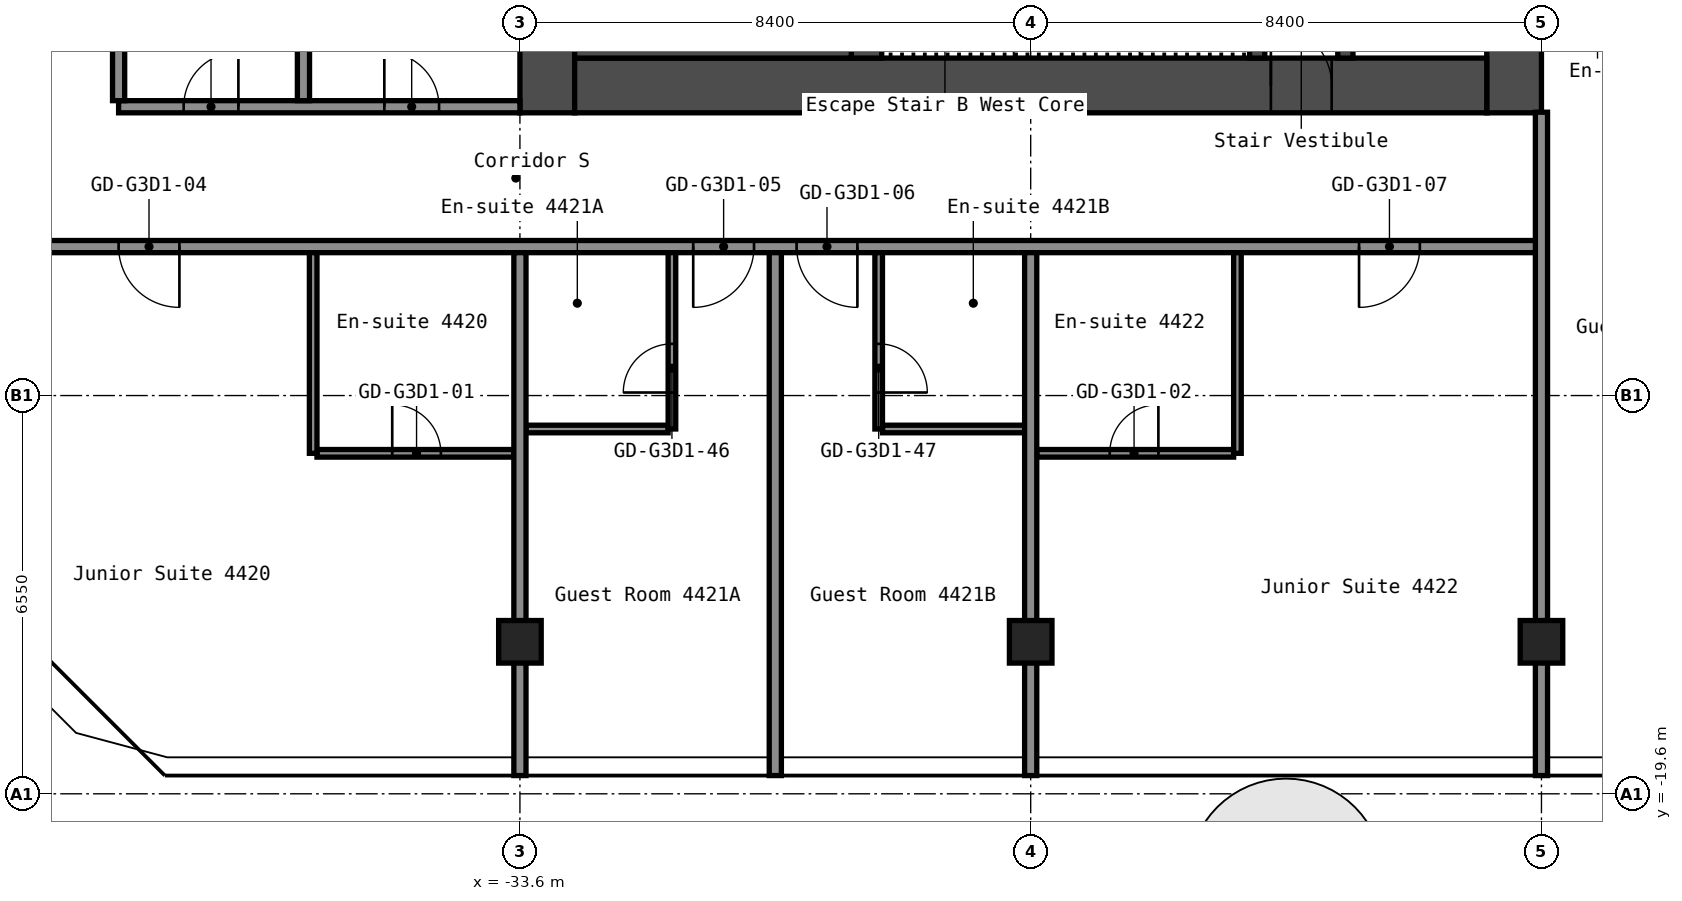
"""IFC4 building model, lengths in metres.
Left out: names, types, materials, properties, quantities, classifications, styles, units other than length and angle.
Written with IfcOpenShell. Run it as: python <this file> out.ifc"""

import sys

from ifc_helpers import new_model, si_unit, direction, frame, frame_2d, origin, origin_2d, place, context, subcontext, project, spatial, rectangle, hollow_rectangle, extrude, element, fill, save


model = new_model("IFC4")
c1 = context("Model", 3, precision=1e-05, world=origin(), true_north=direction((0.0, 1.0)))
c2 = subcontext(c1, "Body", "Model", "MODEL_VIEW")
j1 = project(units=[si_unit("LENGTHUNIT", "METRE"), si_unit("PLANEANGLEUNIT", "RADIAN")], contexts=[c1])
p1 = place(None, origin())
s1 = spatial("IfcSite", under=j1, at=p1, CompositionType="ELEMENT")
p2 = place(p1, origin())
s2 = spatial("IfcBuilding", under=s1, at=p2, CompositionType="ELEMENT")
p3 = place(p2, frame((0.0, 0.0, 156.6)))
s3 = spatial("IfcBuildingStorey", under=s2, at=p3, CompositionType="ELEMENT", Elevation=156.6)
for number, where, z_axis, x_axis in (
    (1, (-33.6, -17.1, 0.0), (0.0, 0.0, 1.0), (1.0, 0.0, 0.0)),
    (2, (-25.2, -17.1, 0.0), (0.0, 0.0, 1.0), (1.0, 0.0, 0.0)),
    (3, (-16.8, -17.1, 0.0), (0.0, 0.0, 1.0), (1.0, 0.0, 0.0)),
):
    element("IfcColumn", number, at=place(p3, frame(where, z_axis=z_axis, x_axis=x_axis)), inside=s3, PredefinedType="COLUMN", context=c2, shape_type="SweptSolid", body=[
        extrude(hollow_rectangle(XDim=0.7, YDim=0.7, WallThickness=0.028, at=origin_2d()), origin(), (0.0, 0.0, 1.0), 2.75),
    ])
p4 = place(p3, frame((-17.25, -8.4, 0.0), z_axis=(0.0, 0.0, 1.0), x_axis=(0.0, 1.0, 0.0)))
e4 = element("IfcWall", 4, at=p4, inside=s3, PredefinedType="SHEAR", context=c2, shape_type="SweptSolid", body=[
    extrude(rectangle(XDim=16.8, YDim=0.9, at=frame_2d((8.4, 0.0))), origin(), (0.0, 0.0, 1.0), 2.75),
])
p5 = place(p4, frame((7.1, 0.0, 0.0)))
e5 = element("IfcOpeningElement", 5, at=p5, cuts=e4, PredefinedType="OPENING", context=c2, shape_type="SweptSolid", body=[
    extrude(rectangle(XDim=1.6, YDim=2.1, at=frame_2d((0.8, 1.05))), frame((0.0, 0.46, 0.0), z_axis=(0.0, -1.0, 0.0), x_axis=(1.0, 0.0, 0.0)), (0.0, 0.0, 1.0), 0.92),
])
p6 = place(p3, frame((-33.15, -8.4, 0.0), z_axis=(0.0, 0.0, 1.0), x_axis=(0.0, 1.0, 0.0)))
e6 = element("IfcWall", 6, at=p6, inside=s3, PredefinedType="SHEAR", context=c2, shape_type="SweptSolid", body=[
    extrude(rectangle(XDim=16.8, YDim=0.9, at=frame_2d((8.4, 0.0))), origin(), (0.0, 0.0, 1.0), 2.75),
])
p7 = place(p3, frame((-32.7, -7.95, 0.0), z_axis=(0.0, 0.0, 1.0), x_axis=(1.0, 0.0, 0.0)))
e7 = element("IfcWall", 7, at=p7, inside=s3, PredefinedType="SHEAR", context=c2, shape_type="SweptSolid", body=[
    extrude(rectangle(XDim=15.0, YDim=0.9, at=frame_2d((7.5, 0.0))), origin(), (0.0, 0.0, 1.0), 2.75),
])
p8 = place(p7, frame((11.45, 0.0, 0.0)))
e8 = element("IfcOpeningElement", 8, at=p8, cuts=e7, PredefinedType="OPENING", context=c2, shape_type="SweptSolid", body=[
    extrude(rectangle(XDim=1.0, YDim=2.1, at=frame_2d((0.5, 1.05))), frame((0.0, 0.46, 0.0), z_axis=(0.0, -1.0, 0.0), x_axis=(1.0, 0.0, 0.0)), (0.0, 0.0, 1.0), 0.92),
])
p9 = place(p3, frame((-20.025, -7.5, 0.0), z_axis=(0.0, 0.0, 1.0), x_axis=(0.0, 1.0, 0.0)))
e9 = element("IfcWall", 9, at=p9, inside=s3, PredefinedType="SHEAR", context=c2, shape_type="SweptSolid", body=[
    extrude(rectangle(XDim=6.3, YDim=0.25, at=frame_2d((3.15, 0.0))), origin(), (0.0, 0.0, 1.0), 2.75),
])
p10 = place(p9, frame((2.4, 0.0, 0.0)))
e10 = element("IfcOpeningElement", 10, at=p10, cuts=e9, PredefinedType="OPENING", context=c2, shape_type="SweptSolid", body=[
    extrude(rectangle(XDim=1.0, YDim=2.1, at=frame_2d((0.5, 1.05))), frame((0.0, 0.135, 0.0), z_axis=(0.0, -1.0, 0.0), x_axis=(1.0, 0.0, 0.0)), (0.0, 0.0, 1.0), 0.27),
])
p11 = place(p3, frame((-21.475, -7.5, 0.0), z_axis=(0.0, 0.0, 1.0), x_axis=(0.0, 1.0, 0.0)))
e11 = element("IfcWall", 11, at=p11, inside=s3, PredefinedType="SHEAR", context=c2, shape_type="SweptSolid", body=[
    extrude(rectangle(XDim=3.75, YDim=0.25, at=frame_2d((1.875, 0.0))), origin(), (0.0, 0.0, 1.0), 2.75),
])
p12 = place(p11, frame((1.3, 0.0, 0.0)))
e12 = element("IfcOpeningElement", 12, at=p12, cuts=e11, PredefinedType="OPENING", context=c2, shape_type="SweptSolid", body=[
    extrude(rectangle(XDim=1.2, YDim=2.1, at=frame_2d((0.6, 1.05))), frame((0.0, 0.135, 0.0), z_axis=(0.0, -1.0, 0.0), x_axis=(1.0, 0.0, 0.0)), (0.0, 0.0, 1.0), 0.27),
])
p13 = place(p3, frame((-27.9, -7.5, 0.0), z_axis=(0.0, 0.0, 1.0), x_axis=(0.0, 1.0, 0.0)))
e13 = element("IfcWall", 13, at=p13, inside=s3, PredefinedType="SHEAR", context=c2, shape_type="SweptSolid", body=[
    extrude(rectangle(XDim=3.75, YDim=0.5, at=frame_2d((1.875, 0.0))), origin(), (0.0, 0.0, 1.0), 2.75),
])
p14 = place(p3, frame((-32.7, -6.75, 0.0), z_axis=(0.0, 0.0, 1.0), x_axis=(1.0, 0.0, 0.0)))
e14 = element("IfcWall", 14, at=p14, inside=s3, PredefinedType="SHEAR", context=c2, shape_type="SweptSolid", body=[
    extrude(rectangle(XDim=4.55, YDim=1.5, at=frame_2d((2.275, 0.0))), origin(), (0.0, 0.0, 1.0), 2.75),
])
p15 = place(p3, frame((-36.938, -14.0, 0.0), z_axis=(0.0, 0.0, 1.0), x_axis=(1.0, 0.0, 0.0)))
e15 = element("IfcWall", 15, at=p15, inside=s3, PredefinedType="PARTITIONING", context=c2, shape_type="SweptSolid", body=[
    extrude(rectangle(XDim=3.238, YDim=0.125, at=frame_2d((1.619, 0.0))), origin(), (0.0, 0.0, 1.0), 2.75),
])
p16 = place(p15, frame((1.238, 0.0, 0.0)))
e16 = element("IfcOpeningElement", 16, at=p16, cuts=e15, PredefinedType="OPENING", context=c2, shape_type="SweptSolid", body=[
    extrude(rectangle(XDim=0.8, YDim=2.1, at=frame_2d((0.4, 1.05))), frame((0.0, 0.073, 0.0), z_axis=(0.0, -1.0, 0.0), x_axis=(1.0, 0.0, 0.0)), (0.0, 0.0, 1.0), 0.145),
])
p17 = place(p3, frame((-25.1, -14.0, 0.0), z_axis=(0.0, 0.0, 1.0), x_axis=(1.0, 0.0, 0.0)))
e17 = element("IfcWall", 17, at=p17, inside=s3, PredefinedType="PARTITIONING", context=c2, shape_type="SweptSolid", body=[
    extrude(rectangle(XDim=3.238, YDim=0.125, at=frame_2d((1.619, 0.0))), origin(), (0.0, 0.0, 1.0), 2.75),
])
p18 = place(p17, frame((1.2, 0.0, 0.0)))
e18 = element("IfcOpeningElement", 18, at=p18, cuts=e17, PredefinedType="OPENING", context=c2, shape_type="SweptSolid", body=[
    extrude(rectangle(XDim=0.8, YDim=2.1, at=frame_2d((0.4, 1.05))), frame((0.0, 0.073, 0.0), z_axis=(0.0, -1.0, 0.0), x_axis=(1.0, 0.0, 0.0)), (0.0, 0.0, 1.0), 0.145),
])
for number, where, z_axis, x_axis in (
    (19, (-33.5, -13.6, 0.0), (0.0, 0.0, 1.0), (1.0, 0.0, 0.0)),
    (20, (-27.637, -13.6, 0.0), (0.0, 0.0, 1.0), (1.0, 0.0, 0.0)),
):
    element("IfcWall", number, at=place(p3, frame(where, z_axis=z_axis, x_axis=x_axis)), inside=s3, PredefinedType="PARTITIONING", context=c2, shape_type="SweptSolid", body=[
        extrude(rectangle(XDim=2.337, YDim=0.125, at=frame_2d((1.169, 0.0))), origin(), (0.0, 0.0, 1.0), 2.75),
    ])
p19 = place(p3, frame((-42.7, -10.6, 0.0), z_axis=(0.0, 0.0, 1.0), x_axis=(1.0, 0.0, 0.0)))
e21 = element("IfcWall", 21, at=p19, inside=s3, PredefinedType="PARTITIONING", context=c2, shape_type="SweptSolid", body=[
    extrude(rectangle(XDim=25.9, YDim=0.2, at=frame_2d((12.95, 0.0))), origin(), (0.0, 0.0, 1.0), 2.75),
])
p20 = place(p19, frame((2.5, 0.0, 0.0)))
e22 = element("IfcOpeningElement", 22, at=p20, cuts=e21, PredefinedType="OPENING", context=c2, shape_type="SweptSolid", body=[
    extrude(rectangle(XDim=1.0, YDim=2.1, at=frame_2d((0.5, 1.05))), frame((0.0, 0.11, 0.0), z_axis=(0.0, -1.0, 0.0), x_axis=(1.0, 0.0, 0.0)), (0.0, 0.0, 1.0), 0.22),
])
p21 = place(p19, frame((11.95, 0.0, 0.0)))
e23 = element("IfcOpeningElement", 23, at=p21, cuts=e21, PredefinedType="OPENING", context=c2, shape_type="SweptSolid", body=[
    extrude(rectangle(XDim=1.0, YDim=2.1, at=frame_2d((0.5, 1.05))), frame((0.0, 0.11, 0.0), z_axis=(0.0, -1.0, 0.0), x_axis=(1.0, 0.0, 0.0)), (0.0, 0.0, 1.0), 0.22),
])
p22 = place(p19, frame((13.65, 0.0, 0.0)))
e24 = element("IfcOpeningElement", 24, at=p22, cuts=e21, PredefinedType="OPENING", context=c2, shape_type="SweptSolid", body=[
    extrude(rectangle(XDim=1.0, YDim=2.1, at=frame_2d((0.5, 1.05))), frame((0.0, 0.11, 0.0), z_axis=(0.0, -1.0, 0.0), x_axis=(1.0, 0.0, 0.0)), (0.0, 0.0, 1.0), 0.22),
])
p23 = place(p19, frame((22.9, 0.0, 0.0)))
e25 = element("IfcOpeningElement", 25, at=p23, cuts=e21, PredefinedType="OPENING", context=c2, shape_type="SweptSolid", body=[
    extrude(rectangle(XDim=1.0, YDim=2.1, at=frame_2d((0.5, 1.05))), frame((0.0, 0.11, 0.0), z_axis=(0.0, -1.0, 0.0), x_axis=(1.0, 0.0, 0.0)), (0.0, 0.0, 1.0), 0.22),
])
p24 = place(p3, frame((-40.2, -8.3, 0.0), z_axis=(0.0, 0.0, 1.0), x_axis=(1.0, 0.0, 0.0)))
e26 = element("IfcWall", 26, at=p24, inside=s3, PredefinedType="PARTITIONING", context=c2, shape_type="SweptSolid", body=[
    extrude(rectangle(XDim=6.6, YDim=0.2, at=frame_2d((3.3, 0.0))), origin(), (0.0, 0.0, 1.0), 2.75),
])
p25 = place(p24, frame((1.07, 0.0, 0.0)))
e27 = element("IfcOpeningElement", 27, at=p25, cuts=e26, PredefinedType="OPENING", context=c2, shape_type="SweptSolid", body=[
    extrude(rectangle(XDim=0.9, YDim=2.1, at=frame_2d((0.45, 1.05))), frame((0.0, 0.11, 0.0), z_axis=(0.0, -1.0, 0.0), x_axis=(1.0, 0.0, 0.0)), (0.0, 0.0, 1.0), 0.22),
])
p26 = place(p24, frame((4.37, 0.0, 0.0)))
e28 = element("IfcOpeningElement", 28, at=p26, cuts=e26, PredefinedType="OPENING", context=c2, shape_type="SweptSolid", body=[
    extrude(rectangle(XDim=0.9, YDim=2.1, at=frame_2d((0.45, 1.05))), frame((0.0, 0.11, 0.0), z_axis=(0.0, -1.0, 0.0), x_axis=(1.0, 0.0, 0.0)), (0.0, 0.0, 1.0), 0.22),
])
p27 = place(p3, frame((-40.2, -8.2, 0.0), z_axis=(0.0, 0.0, 1.0), x_axis=(0.0, 1.0, 0.0)))
e29 = element("IfcWall", 29, at=p27, inside=s3, PredefinedType="PARTITIONING", context=c2, shape_type="SweptSolid", body=[
    extrude(rectangle(XDim=16.4, YDim=0.2, at=frame_2d((8.2, 0.0))), origin(), (0.0, 0.0, 1.0), 2.75),
])
p28 = place(p3, frame((-37.16, -8.2, 0.0), z_axis=(0.0, 0.0, 1.0), x_axis=(0.0, 1.0, 0.0)))
e30 = element("IfcWall", 30, at=p28, inside=s3, PredefinedType="PARTITIONING", context=c2, shape_type="SweptSolid", body=[
    extrude(rectangle(XDim=8.2, YDim=0.2, at=frame_2d((4.1, 0.0))), origin(), (0.0, 0.0, 1.0), 2.75),
])
p29 = place(p3, frame((-37.0, -14.0, 0.0), z_axis=(0.0, 0.0, 1.0), x_axis=(0.0, 1.0, 0.0)))
e31 = element("IfcWall", 31, at=p29, inside=s3, PredefinedType="PARTITIONING", context=c2, shape_type="SweptSolid", body=[
    extrude(rectangle(XDim=3.3, YDim=0.125, at=frame_2d((1.65, 0.0))), origin(), (0.0, 0.0, 1.0), 2.75),
])
p30 = place(p3, frame((-33.6, -19.3, 0.0), z_axis=(0.0, 0.0, 1.0), x_axis=(0.0, 1.0, 0.0)))
e32 = element("IfcWall", 32, at=p30, inside=s3, PredefinedType="PARTITIONING", context=c2, shape_type="SweptSolid", body=[
    extrude(rectangle(XDim=8.6, YDim=0.2, at=frame_2d((4.3, 0.0))), origin(), (0.0, 0.0, 1.0), 2.75),
])
p31 = place(p3, frame((-31.1, -13.6, 0.0), z_axis=(0.0, 0.0, 1.0), x_axis=(0.0, 1.0, 0.0)))
e33 = element("IfcWall", 33, at=p31, inside=s3, PredefinedType="PARTITIONING", context=c2, shape_type="SweptSolid", body=[
    extrude(rectangle(XDim=2.9, YDim=0.125, at=frame_2d((1.45, 0.0))), origin(), (0.0, 0.0, 1.0), 2.75),
])
p32 = place(p31, frame((0.6, 0.0, 0.0)))
e34 = element("IfcOpeningElement", 34, at=p32, cuts=e33, PredefinedType="OPENING", context=c2, shape_type="SweptSolid", body=[
    extrude(rectangle(XDim=0.8, YDim=2.1, at=frame_2d((0.4, 1.05))), frame((0.0, 0.073, 0.0), z_axis=(0.0, -1.0, 0.0), x_axis=(1.0, 0.0, 0.0)), (0.0, 0.0, 1.0), 0.145),
])
p33 = place(p3, frame((-29.4, -19.3, 0.0), z_axis=(0.0, 0.0, 1.0), x_axis=(0.0, 1.0, 0.0)))
e35 = element("IfcWall", 35, at=p33, inside=s3, PredefinedType="PARTITIONING", context=c2, shape_type="SweptSolid", body=[
    extrude(rectangle(XDim=8.6, YDim=0.2, at=frame_2d((4.3, 0.0))), origin(), (0.0, 0.0, 1.0), 2.75),
])
p34 = place(p3, frame((-27.7, -13.6, 0.0), z_axis=(0.0, 0.0, 1.0), x_axis=(0.0, 1.0, 0.0)))
e36 = element("IfcWall", 36, at=p34, inside=s3, PredefinedType="PARTITIONING", context=c2, shape_type="SweptSolid", body=[
    extrude(rectangle(XDim=2.9, YDim=0.125, at=frame_2d((1.45, 0.0))), origin(), (0.0, 0.0, 1.0), 2.75),
])
p35 = place(p34, frame((0.6, 0.0, 0.0)))
e37 = element("IfcOpeningElement", 37, at=p35, cuts=e36, PredefinedType="OPENING", context=c2, shape_type="SweptSolid", body=[
    extrude(rectangle(XDim=0.8, YDim=2.1, at=frame_2d((0.4, 1.05))), frame((0.0, 0.073, 0.0), z_axis=(0.0, -1.0, 0.0), x_axis=(1.0, 0.0, 0.0)), (0.0, 0.0, 1.0), 0.145),
])
p36 = place(p3, frame((-25.2, -19.3, 0.0), z_axis=(0.0, 0.0, 1.0), x_axis=(0.0, 1.0, 0.0)))
e38 = element("IfcWall", 38, at=p36, inside=s3, PredefinedType="PARTITIONING", context=c2, shape_type="SweptSolid", body=[
    extrude(rectangle(XDim=8.6, YDim=0.2, at=frame_2d((4.3, 0.0))), origin(), (0.0, 0.0, 1.0), 2.75),
])
p37 = place(p3, frame((-21.8, -14.0, 0.0), z_axis=(0.0, 0.0, 1.0), x_axis=(0.0, 1.0, 0.0)))
e39 = element("IfcWall", 39, at=p37, inside=s3, PredefinedType="PARTITIONING", context=c2, shape_type="SweptSolid", body=[
    extrude(rectangle(XDim=3.3, YDim=0.125, at=frame_2d((1.65, 0.0))), origin(), (0.0, 0.0, 1.0), 2.75),
])
p38 = place(p3, frame((-16.8, -19.3, 0.0), z_axis=(0.0, 0.0, 1.0), x_axis=(0.0, 1.0, 0.0)))
e40 = element("IfcWall", 40, at=p38, inside=s3, PredefinedType="PARTITIONING", context=c2, shape_type="SweptSolid", body=[
    extrude(rectangle(XDim=10.91, YDim=0.2, at=frame_2d((5.455, 0.0))), origin(), (0.0, 0.0, 1.0), 2.75),
])
p39 = place(p8, origin())
e41 = element("IfcDoor", 41, at=p39, inside=s3, OperationType="SINGLE_SWING_RIGHT", PredefinedType="DOOR", context=c2, shape_type="SweptSolid", body=[
    extrude(rectangle(XDim=1.0, YDim=2.1, at=frame_2d((0.5, 1.05))), frame((0.0, 0.025, 0.0), z_axis=(0.0, -1.0, 0.0), x_axis=(1.0, 0.0, 0.0)), (0.0, 0.0, 1.0), 0.05),
])
fill(e8, e41)
p40 = place(p16, origin())
e42 = element("IfcDoor", 42, at=p40, inside=s3, OperationType="SINGLE_SWING_RIGHT", PredefinedType="DOOR", context=c2, shape_type="SweptSolid", body=[
    extrude(rectangle(XDim=0.8, YDim=2.1, at=frame_2d((0.4, 1.05))), frame((0.0, 0.025, 0.0), z_axis=(0.0, -1.0, 0.0), x_axis=(1.0, 0.0, 0.0)), (0.0, 0.0, 1.0), 0.05),
])
fill(e16, e42)
p41 = place(p18, origin())
e43 = element("IfcDoor", 43, at=p41, inside=s3, OperationType="SINGLE_SWING_LEFT", PredefinedType="DOOR", context=c2, shape_type="SweptSolid", body=[
    extrude(rectangle(XDim=0.8, YDim=2.1, at=frame_2d((0.4, 1.05))), frame((0.0, 0.025, 0.0), z_axis=(0.0, -1.0, 0.0), x_axis=(1.0, 0.0, 0.0)), (0.0, 0.0, 1.0), 0.05),
])
fill(e18, e43)
p42 = place(p20, origin())
e44 = element("IfcDoor", 44, at=p42, inside=s3, OperationType="SINGLE_SWING_RIGHT", PredefinedType="DOOR", context=c2, shape_type="SweptSolid", body=[
    extrude(rectangle(XDim=1.0, YDim=2.1, at=frame_2d((0.5, 1.05))), frame((0.0, 0.025, 0.0), z_axis=(0.0, -1.0, 0.0), x_axis=(1.0, 0.0, 0.0)), (0.0, 0.0, 1.0), 0.05),
])
fill(e22, e44)
p43 = place(p21, origin())
e45 = element("IfcDoor", 45, at=p43, inside=s3, OperationType="SINGLE_SWING_LEFT", PredefinedType="DOOR", context=c2, shape_type="SweptSolid", body=[
    extrude(rectangle(XDim=1.0, YDim=2.1, at=frame_2d((0.5, 1.05))), frame((0.0, 0.025, 0.0), z_axis=(0.0, -1.0, 0.0), x_axis=(1.0, 0.0, 0.0)), (0.0, 0.0, 1.0), 0.05),
])
fill(e23, e45)
p44 = place(p22, origin())
e46 = element("IfcDoor", 46, at=p44, inside=s3, OperationType="SINGLE_SWING_RIGHT", PredefinedType="DOOR", context=c2, shape_type="SweptSolid", body=[
    extrude(rectangle(XDim=1.0, YDim=2.1, at=frame_2d((0.5, 1.05))), frame((0.0, 0.025, 0.0), z_axis=(0.0, -1.0, 0.0), x_axis=(1.0, 0.0, 0.0)), (0.0, 0.0, 1.0), 0.05),
])
fill(e24, e46)
p45 = place(p23, origin())
e47 = element("IfcDoor", 47, at=p45, inside=s3, OperationType="SINGLE_SWING_LEFT", PredefinedType="DOOR", context=c2, shape_type="SweptSolid", body=[
    extrude(rectangle(XDim=1.0, YDim=2.1, at=frame_2d((0.5, 1.05))), frame((0.0, 0.025, 0.0), z_axis=(0.0, -1.0, 0.0), x_axis=(1.0, 0.0, 0.0)), (0.0, 0.0, 1.0), 0.05),
])
fill(e25, e47)
p46 = place(p25, origin())
e48 = element("IfcDoor", 48, at=p46, inside=s3, OperationType="SINGLE_SWING_LEFT", PredefinedType="DOOR", context=c2, shape_type="SweptSolid", body=[
    extrude(rectangle(XDim=0.9, YDim=2.1, at=frame_2d((0.45, 1.05))), frame((0.0, 0.025, 0.0), z_axis=(0.0, -1.0, 0.0), x_axis=(1.0, 0.0, 0.0)), (0.0, 0.0, 1.0), 0.05),
])
fill(e27, e48)
p47 = place(p26, origin())
e49 = element("IfcDoor", 49, at=p47, inside=s3, OperationType="SINGLE_SWING_RIGHT", PredefinedType="DOOR", context=c2, shape_type="SweptSolid", body=[
    extrude(rectangle(XDim=0.9, YDim=2.1, at=frame_2d((0.45, 1.05))), frame((0.0, 0.025, 0.0), z_axis=(0.0, -1.0, 0.0), x_axis=(1.0, 0.0, 0.0)), (0.0, 0.0, 1.0), 0.05),
])
fill(e28, e49)
p48 = place(p32, origin())
e50 = element("IfcDoor", 50, at=p48, inside=s3, OperationType="SINGLE_SWING_RIGHT", PredefinedType="DOOR", context=c2, shape_type="SweptSolid", body=[
    extrude(rectangle(XDim=0.8, YDim=2.1, at=frame_2d((0.4, 1.05))), frame((0.0, 0.025, 0.0), z_axis=(0.0, -1.0, 0.0), x_axis=(1.0, 0.0, 0.0)), (0.0, 0.0, 1.0), 0.05),
])
fill(e34, e50)
p49 = place(p35, origin())
e51 = element("IfcDoor", 51, at=p49, inside=s3, OperationType="SINGLE_SWING_LEFT", PredefinedType="DOOR", context=c2, shape_type="SweptSolid", body=[
    extrude(rectangle(XDim=0.8, YDim=2.1, at=frame_2d((0.4, 1.05))), frame((0.0, 0.025, 0.0), z_axis=(0.0, -1.0, 0.0), x_axis=(1.0, 0.0, 0.0)), (0.0, 0.0, 1.0), 0.05),
])
fill(e37, e51)
save(model, sys.argv[1])
